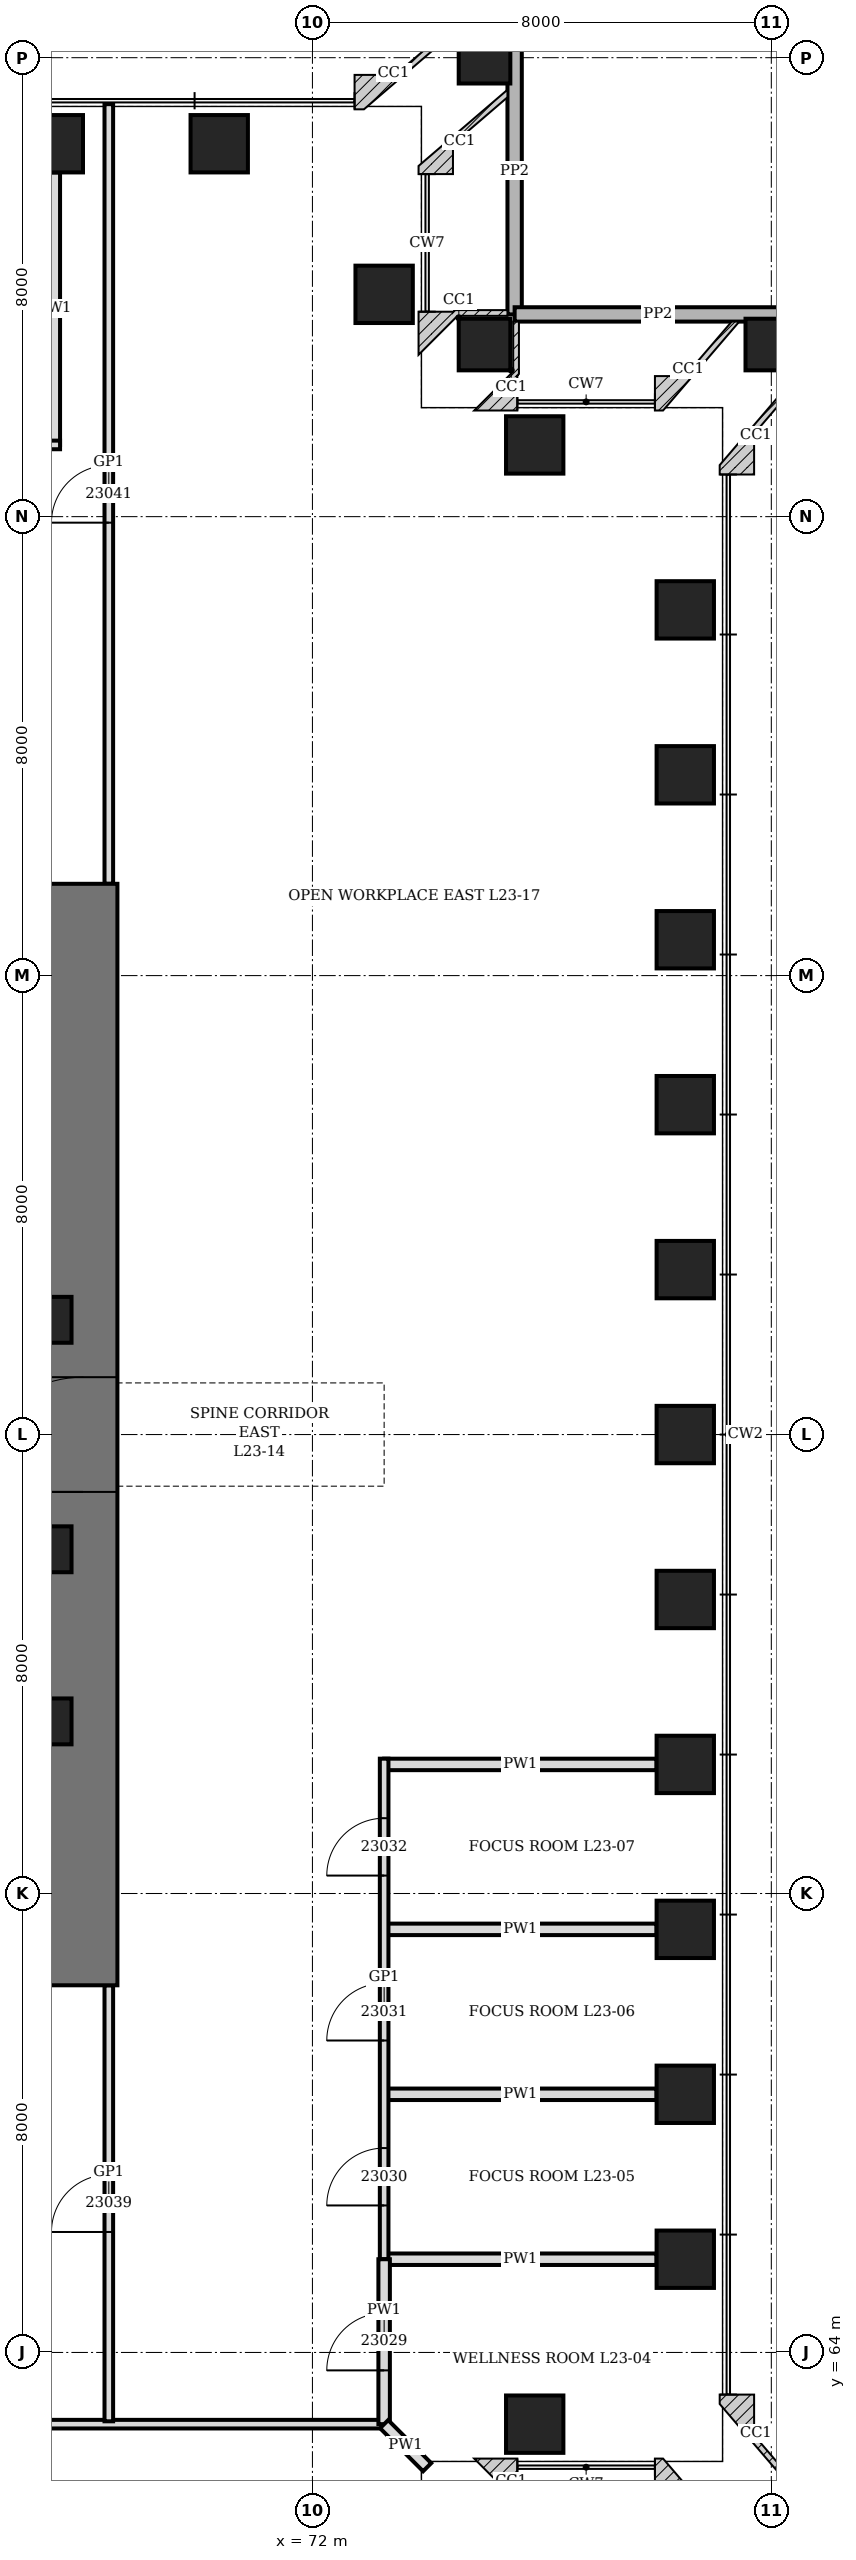
"""IFC4 building model, lengths in metres.
Left out: names, types, materials, properties, quantities, classifications, styles, units other than length and angle.
Written with IfcOpenShell. Run it as: python <this file> out.ifc"""

import sys

from ifc_helpers import new_model, si_unit, direction, frame, frame_2d, origin, origin_2d, place, context, subcontext, project, spatial, rectangle, hollow_rectangle, extrude, clip, halfspace, element, fill, save


model = new_model("IFC4")
c1 = context("Model", 3, precision=1e-05, world=origin(), true_north=direction((0.0, 1.0)))
c2 = subcontext(c1, "Body", "Model", "MODEL_VIEW")
j1 = project(units=[si_unit("LENGTHUNIT", "METRE"), si_unit("PLANEANGLEUNIT", "RADIAN")], contexts=[c1])
p1 = place(None, origin())
s1 = spatial("IfcSite", under=j1, at=p1, CompositionType="ELEMENT")
p2 = place(p1, origin())
s2 = spatial("IfcBuilding", under=s1, at=p2, CompositionType="ELEMENT")
p3 = place(p2, frame((0.0, 0.0, 108.1)))
s3 = spatial("IfcBuildingStorey", under=s2, at=p3, CompositionType="ELEMENT", Elevation=108.1)
p4 = place(p3, frame((75.0, 61.0, -0.25), z_axis=(-0.343685624304, 0.343685624304, 0.873933855216), x_axis=(-0.707106781187, -0.707106781187, 0.0)))
e1 = element("IfcColumn", 1, at=p4, inside=s3, PredefinedType="COLUMN", context=c2, shape_type="Clipping", body=[
    clip(clip(extrude(hollow_rectangle(XDim=0.9, YDim=0.9, WallThickness=0.2, at=origin_2d()), origin(), (0.0, 0.0, 1.0), 5.092), halfspace(frame((0.0, 0.0, 0.253), z_axis=(0.0, 0.0, 1.0), x_axis=(1.0, 0.0, 0.0)), True)), halfspace(frame((0.0, 0.0, 4.839), z_axis=(0.0, 0.0, -1.0), x_axis=(1.0, 0.0, 0.0)), True)),
])
p5 = place(p3, frame((75.875, 62.75, -0.25), z_axis=(0.0, 0.0, 1.0), x_axis=(1.0, 0.0, 0.0)))
e2 = element("IfcColumn", 2, at=p5, inside=s3, PredefinedType="COLUMN", context=c2, shape_type="SweptSolid", body=[
    extrude(hollow_rectangle(XDim=1.0, YDim=1.0, WallThickness=0.35, at=origin_2d()), origin(), (0.0, 0.0, 1.0), 4.45),
])
p6 = place(p3, frame((80.0, 61.0, -0.25), z_axis=(-0.299314960964, 0.349200787792, 0.887957974202), x_axis=(-0.759256602365, -0.650791373456, 0.0)))
e3 = element("IfcColumn", 3, at=p6, inside=s3, PredefinedType="COLUMN", context=c2, shape_type="Clipping", body=[
    clip(clip(extrude(hollow_rectangle(XDim=0.9, YDim=0.9, WallThickness=0.2, at=origin_2d()), origin(), (0.0, 0.0, 1.0), 5.011), halfspace(frame((0.0, 0.0, 0.235), z_axis=(0.0, 0.0, 1.0), x_axis=(1.0, 0.0, 0.0)), True)), halfspace(frame((0.0, 0.0, 4.776), z_axis=(0.0, 0.0, -1.0), x_axis=(1.0, 0.0, 0.0)), True)),
])
for number, where, z_axis, x_axis in (
    (4, (78.5, 65.625, -0.25), (0.0, 0.0, 1.0), (0.0, 1.0, 0.0)),
    (5, (78.5, 68.5, -0.25), (0.0, 0.0, 1.0), (0.0, 1.0, 0.0)),
    (6, (78.5, 71.375, -0.25), (0.0, 0.0, 1.0), (0.0, 1.0, 0.0)),
    (7, (78.5, 74.25, -0.25), (0.0, 0.0, 1.0), (0.0, 1.0, 0.0)),
    (8, (78.5, 77.125, -0.25), (0.0, 0.0, 1.0), (0.0, 1.0, 0.0)),
    (9, (78.5, 80.0, -0.25), (0.0, 0.0, 1.0), (0.0, 1.0, 0.0)),
    (10, (78.5, 82.875, -0.25), (0.0, 0.0, 1.0), (0.0, 1.0, 0.0)),
    (11, (78.5, 85.75, -0.25), (0.0, 0.0, 1.0), (0.0, 1.0, 0.0)),
    (12, (78.5, 88.625, -0.25), (0.0, 0.0, 1.0), (0.0, 1.0, 0.0)),
    (13, (78.5, 91.5, -0.25), (0.0, 0.0, 1.0), (0.0, 1.0, 0.0)),
    (14, (78.5, 94.375, -0.25), (0.0, 0.0, 1.0), (0.0, 1.0, 0.0)),
):
    element("IfcColumn", number, at=place(p3, frame(where, z_axis=z_axis, x_axis=x_axis)), inside=s3, PredefinedType="COLUMN", context=c2, shape_type="SweptSolid", body=[
        extrude(hollow_rectangle(XDim=1.0, YDim=1.0, WallThickness=0.35, at=origin_2d()), origin(), (0.0, 0.0, 1.0), 4.45),
    ])
p7 = place(p3, frame((80.0, 99.0, -0.25), z_axis=(-0.299314960964, -0.349200787792, 0.887957974202), x_axis=(0.759256602365, -0.650791373456, 0.0)))
e15 = element("IfcColumn", 15, at=p7, inside=s3, PredefinedType="COLUMN", context=c2, shape_type="Clipping", body=[
    clip(clip(extrude(hollow_rectangle(XDim=0.9, YDim=0.9, WallThickness=0.2, at=origin_2d()), origin(), (0.0, 0.0, 1.0), 5.011), halfspace(frame((0.0, 0.0, 0.235), z_axis=(0.0, 0.0, 1.0), x_axis=(1.0, 0.0, 0.0)), True)), halfspace(frame((0.0, 0.0, 4.776), z_axis=(0.0, 0.0, -1.0), x_axis=(1.0, 0.0, 0.0)), True)),
])
p8 = place(p3, frame((75.875, 97.25, -0.25), z_axis=(0.0, 0.0, 1.0), x_axis=(1.0, 0.0, 0.0)))
e16 = element("IfcColumn", 16, at=p8, inside=s3, PredefinedType="COLUMN", context=c2, shape_type="SweptSolid", body=[
    extrude(hollow_rectangle(XDim=1.0, YDim=1.0, WallThickness=0.35, at=origin_2d()), origin(), (0.0, 0.0, 1.0), 4.45),
])
p9 = place(p3, frame((75.0, 99.0, -0.25), z_axis=(-0.343685624304, -0.343685624304, 0.873933855216), x_axis=(0.707106781187, -0.707106781187, 0.0)))
e17 = element("IfcColumn", 17, at=p9, inside=s3, PredefinedType="COLUMN", context=c2, shape_type="Clipping", body=[
    clip(clip(extrude(hollow_rectangle(XDim=0.9, YDim=0.9, WallThickness=0.2, at=origin_2d()), origin(), (0.0, 0.0, 1.0), 5.092), halfspace(frame((0.0, 0.0, 0.253), z_axis=(0.0, 0.0, 1.0), x_axis=(1.0, 0.0, 0.0)), True)), halfspace(frame((0.0, 0.0, 4.839), z_axis=(0.0, 0.0, -1.0), x_axis=(1.0, 0.0, 0.0)), True)),
])
p10 = place(p3, frame((73.25, 99.875, -0.25), z_axis=(0.0, 0.0, 1.0), x_axis=(0.0, 1.0, 0.0)))
e18 = element("IfcColumn", 18, at=p10, inside=s3, PredefinedType="COLUMN", context=c2, shape_type="SweptSolid", body=[
    extrude(hollow_rectangle(XDim=1.0, YDim=1.0, WallThickness=0.35, at=origin_2d()), origin(), (0.0, 0.0, 1.0), 4.45),
])
p11 = place(p3, frame((75.0, 104.0, -0.25), z_axis=(-0.349200787792, -0.299314960964, 0.887957974202), x_axis=(0.650791373456, -0.759256602365, 0.0)))
e19 = element("IfcColumn", 19, at=p11, inside=s3, PredefinedType="COLUMN", context=c2, shape_type="Clipping", body=[
    clip(clip(extrude(hollow_rectangle(XDim=0.9, YDim=0.9, WallThickness=0.2, at=origin_2d()), origin(), (0.0, 0.0, 1.0), 5.011), halfspace(frame((0.0, 0.0, 0.235), z_axis=(0.0, 0.0, 1.0), x_axis=(1.0, 0.0, 0.0)), True)), halfspace(frame((0.0, 0.0, 4.776), z_axis=(0.0, 0.0, -1.0), x_axis=(1.0, 0.0, 0.0)), True)),
])
for number, where, z_axis, x_axis in (
    (20, (70.375, 102.5, -0.25), (0.0, 0.0, 1.0), (1.0, 0.0, 0.0)),
    (21, (67.5, 102.5, -0.25), (0.0, 0.0, 1.0), (1.0, 0.0, 0.0)),
):
    element("IfcColumn", number, at=place(p3, frame(where, z_axis=z_axis, x_axis=x_axis)), inside=s3, PredefinedType="COLUMN", context=c2, shape_type="SweptSolid", body=[
        extrude(hollow_rectangle(XDim=1.0, YDim=1.0, WallThickness=0.35, at=origin_2d()), origin(), (0.0, 0.0, 1.0), 4.45),
    ])
p12 = place(p3, frame((68.0, 70.4, 0.0), z_axis=(0.0, 0.0, 1.0), x_axis=(0.0, 1.0, 0.0)))
e22 = element("IfcWall", 22, at=p12, inside=s3, PredefinedType="SHEAR", context=c2, shape_type="SweptSolid", body=[
    extrude(rectangle(XDim=19.2, YDim=1.2, at=frame_2d((9.6, 0.0))), origin(), (0.0, 0.0, 1.0), 4.2),
])
p13 = place(p12, frame((8.6, 0.0, 0.0)))
e23 = element("IfcOpeningElement", 23, at=p13, cuts=e22, PredefinedType="OPENING", context=c2, shape_type="SweptSolid", body=[
    extrude(rectangle(XDim=2.0, YDim=2.4, at=frame_2d((1.0, 1.2))), frame((0.0, 0.61, 0.0), z_axis=(0.0, -1.0, 0.0), x_axis=(1.0, 0.0, 0.0)), (0.0, 0.0, 1.0), 1.22),
])
for number, where, z_axis, x_axis in (
    (24, (67.4, 75.0, 0.0), (0.0, 0.0, 1.0), (1.0, 0.0, 0.0)),
    (25, (67.4, 78.0, 0.0), (0.0, 0.0, 1.0), (1.0, 0.0, 0.0)),
    (26, (67.4, 82.0, 0.0), (0.0, 0.0, 1.0), (1.0, 0.0, 0.0)),
):
    element("IfcColumn", number, at=place(p3, frame(where, z_axis=z_axis, x_axis=x_axis)), inside=s3, PredefinedType="COLUMN", context=c2, shape_type="SweptSolid", body=[
        extrude(hollow_rectangle(XDim=0.8, YDim=0.8, WallThickness=0.1, at=origin_2d()), origin(), (0.0, 0.0, 1.0), 4.2),
    ])
for number, where, z_axis, x_axis in (
    (27, (75.525, 104.525, 0.0), (0.0, 0.0, 1.0), (0.0, -1.0, 0.0)),
    (28, (75.525, 99.525, 0.0), (0.0, 0.0, 1.0), (1.0, 0.0, 0.0)),
):
    element("IfcWall", number, at=place(p3, frame(where, z_axis=z_axis, x_axis=x_axis)), inside=s3, PredefinedType="PARAPET", context=c2, shape_type="SweptSolid", body=[
        extrude(rectangle(XDim=5.0, YDim=0.25, at=frame_2d((2.5, 0.0))), origin(), (0.0, 0.0, 1.0), 1.1),
    ])
for number, where, z_axis, x_axis in (
    (29, (73.25, 65.625, 0.0), (0.0, 0.0, 1.0), (1.0, 0.0, 0.0)),
    (30, (73.25, 68.5, 0.0), (0.0, 0.0, 1.0), (1.0, 0.0, 0.0)),
    (31, (73.25, 71.375, 0.0), (0.0, 0.0, 1.0), (1.0, 0.0, 0.0)),
    (32, (73.25, 74.25, 0.0), (0.0, 0.0, 1.0), (1.0, 0.0, 0.0)),
):
    element("IfcWall", number, at=place(p3, frame(where, z_axis=z_axis, x_axis=x_axis)), inside=s3, PredefinedType="PARTITIONING", context=c2, shape_type="SweptSolid", body=[
        extrude(rectangle(XDim=4.75, YDim=0.2, at=frame_2d((2.375, 0.0))), origin(), (0.0, 0.0, 1.0), 3.428),
    ])
p14 = place(p3, frame((67.5, 97.25, 0.0), z_axis=(0.0, 0.0, 1.0), x_axis=(0.0, 1.0, 0.0)))
e33 = element("IfcWall", 33, at=p14, inside=s3, PredefinedType="PARTITIONING", context=c2, shape_type="SweptSolid", body=[
    extrude(rectangle(XDim=4.75, YDim=0.2, at=frame_2d((2.375, 0.0))), origin(), (0.0, 0.0, 1.0), 2.74),
])
p15 = place(p3, frame((38.75, 62.75, 0.0), z_axis=(0.0, 0.0, 1.0), x_axis=(1.0, 0.0, 0.0)))
e34 = element("IfcWall", 34, at=p15, inside=s3, PredefinedType="PARTITIONING", context=c2, shape_type="SweptSolid", body=[
    extrude(rectangle(XDim=34.5, YDim=0.15, at=frame_2d((17.25, 0.0))), origin(), (0.0, 0.0, 1.0), 4.04),
])
p16 = place(p15, frame((3.5, 0.0, 0.0)))
e35 = element("IfcOpeningElement", 35, at=p16, cuts=e34, PredefinedType="OPENING", context=c2, shape_type="SweptSolid", body=[
    extrude(rectangle(XDim=1.0, YDim=2.4, at=frame_2d((0.5, 1.2))), frame((0.0, 0.085, 0.0), z_axis=(0.0, -1.0, 0.0), x_axis=(1.0, 0.0, 0.0)), (0.0, 0.0, 1.0), 0.17),
])
p17 = place(p15, frame((15.312, 0.0, 0.0)))
e36 = element("IfcOpeningElement", 36, at=p17, cuts=e34, PredefinedType="OPENING", context=c2, shape_type="SweptSolid", body=[
    extrude(rectangle(XDim=1.0, YDim=2.4, at=frame_2d((0.5, 1.2))), frame((0.0, 0.085, 0.0), z_axis=(0.0, -1.0, 0.0), x_axis=(1.0, 0.0, 0.0)), (0.0, 0.0, 1.0), 0.17),
])
p18 = place(p15, frame((26.812, 0.0, 0.0)))
e37 = element("IfcOpeningElement", 37, at=p18, cuts=e34, PredefinedType="OPENING", context=c2, shape_type="SweptSolid", body=[
    extrude(rectangle(XDim=1.0, YDim=2.4, at=frame_2d((0.5, 1.2))), frame((0.0, 0.085, 0.0), z_axis=(0.0, -1.0, 0.0), x_axis=(1.0, 0.0, 0.0)), (0.0, 0.0, 1.0), 0.17),
])
p19 = place(p3, frame((38.75, 97.25, 0.0), z_axis=(0.0, 0.0, 1.0), x_axis=(1.0, 0.0, 0.0)))
e38 = element("IfcWall", 38, at=p19, inside=s3, PredefinedType="PARTITIONING", context=c2, shape_type="SweptSolid", body=[
    extrude(rectangle(XDim=28.85, YDim=0.15, at=frame_2d((14.425, 0.0))), origin(), (0.0, 0.0, 1.0), 4.04),
])
p20 = place(p19, frame((3.5, 0.0, 0.0)))
e39 = element("IfcOpeningElement", 39, at=p20, cuts=e38, PredefinedType="OPENING", context=c2, shape_type="SweptSolid", body=[
    extrude(rectangle(XDim=1.0, YDim=2.4, at=frame_2d((0.5, 1.2))), frame((0.0, 0.085, 0.0), z_axis=(0.0, -1.0, 0.0), x_axis=(1.0, 0.0, 0.0)), (0.0, 0.0, 1.0), 0.17),
])
p21 = place(p19, frame((15.312, 0.0, 0.0)))
e40 = element("IfcOpeningElement", 40, at=p21, cuts=e38, PredefinedType="OPENING", context=c2, shape_type="SweptSolid", body=[
    extrude(rectangle(XDim=1.0, YDim=2.4, at=frame_2d((0.5, 1.2))), frame((0.0, 0.085, 0.0), z_axis=(0.0, -1.0, 0.0), x_axis=(1.0, 0.0, 0.0)), (0.0, 0.0, 1.0), 0.17),
])
p22 = place(p19, frame((23.938, 0.0, 0.0)))
e41 = element("IfcOpeningElement", 41, at=p22, cuts=e38, PredefinedType="OPENING", context=c2, shape_type="SweptSolid", body=[
    extrude(rectangle(XDim=1.0, YDim=2.4, at=frame_2d((0.5, 1.2))), frame((0.0, 0.085, 0.0), z_axis=(0.0, -1.0, 0.0), x_axis=(1.0, 0.0, 0.0)), (0.0, 0.0, 1.0), 0.17),
])
p23 = place(p3, frame((68.45, 62.8, 0.0), z_axis=(0.0, 0.0, 1.0), x_axis=(0.0, 1.0, 0.0)))
e42 = element("IfcWall", 42, at=p23, inside=s3, PredefinedType="PARTITIONING", context=c2, shape_type="SweptSolid", body=[
    extrude(rectangle(XDim=7.6, YDim=0.15, at=frame_2d((3.8, 0.0))), origin(), (0.0, 0.0, 1.0), 4.04),
])
p24 = place(p23, frame((3.3, 0.0, 0.0)))
e43 = element("IfcOpeningElement", 43, at=p24, cuts=e42, PredefinedType="OPENING", context=c2, shape_type="SweptSolid", body=[
    extrude(rectangle(XDim=1.0, YDim=2.4, at=frame_2d((0.5, 1.2))), frame((0.0, 0.085, 0.0), z_axis=(0.0, -1.0, 0.0), x_axis=(1.0, 0.0, 0.0)), (0.0, 0.0, 1.0), 0.17),
])
p25 = place(p3, frame((68.45, 89.6, 0.0), z_axis=(0.0, 0.0, 1.0), x_axis=(0.0, 1.0, 0.0)))
e44 = element("IfcWall", 44, at=p25, inside=s3, PredefinedType="PARTITIONING", context=c2, shape_type="SweptSolid", body=[
    extrude(rectangle(XDim=13.59, YDim=0.15, at=frame_2d((6.795, 0.0))), origin(), (0.0, 0.0, 1.0), 4.04),
])
p26 = place(p25, frame((6.295, 0.0, 0.0)))
e45 = element("IfcOpeningElement", 45, at=p26, cuts=e44, PredefinedType="OPENING", context=c2, shape_type="SweptSolid", body=[
    extrude(rectangle(XDim=1.0, YDim=2.4, at=frame_2d((0.5, 1.2))), frame((0.0, 0.085, 0.0), z_axis=(0.0, -1.0, 0.0), x_axis=(1.0, 0.0, 0.0)), (0.0, 0.0, 1.0), 0.17),
])
p27 = place(p3, frame((73.25, 65.625, 0.0), z_axis=(0.0, 0.0, 1.0), x_axis=(0.0, 1.0, 0.0)))
e46 = element("IfcWall", 46, at=p27, inside=s3, PredefinedType="PARTITIONING", context=c2, shape_type="SweptSolid", body=[
    extrude(rectangle(XDim=8.725, YDim=0.15, at=frame_2d((4.363, 0.0))), origin(), (0.0, 0.0, 1.0), 4.04),
])
p28 = place(p27, frame((0.938, 0.0, 0.0)))
e47 = element("IfcOpeningElement", 47, at=p28, cuts=e46, PredefinedType="OPENING", context=c2, shape_type="SweptSolid", body=[
    extrude(rectangle(XDim=1.0, YDim=2.4, at=frame_2d((0.5, 1.2))), frame((0.0, 0.085, 0.0), z_axis=(0.0, -1.0, 0.0), x_axis=(1.0, 0.0, 0.0)), (0.0, 0.0, 1.0), 0.17),
])
p29 = place(p27, frame((3.812, 0.0, 0.0)))
e48 = element("IfcOpeningElement", 48, at=p29, cuts=e46, PredefinedType="OPENING", context=c2, shape_type="SweptSolid", body=[
    extrude(rectangle(XDim=1.0, YDim=2.4, at=frame_2d((0.5, 1.2))), frame((0.0, 0.085, 0.0), z_axis=(0.0, -1.0, 0.0), x_axis=(1.0, 0.0, 0.0)), (0.0, 0.0, 1.0), 0.17),
])
p30 = place(p27, frame((6.688, 0.0, 0.0)))
e49 = element("IfcOpeningElement", 49, at=p30, cuts=e46, PredefinedType="OPENING", context=c2, shape_type="SweptSolid", body=[
    extrude(rectangle(XDim=1.0, YDim=2.4, at=frame_2d((0.5, 1.2))), frame((0.0, 0.085, 0.0), z_axis=(0.0, -1.0, 0.0), x_axis=(1.0, 0.0, 0.0)), (0.0, 0.0, 1.0), 0.17),
])
p31 = place(p3, frame((73.25, 62.75, 0.0), z_axis=(0.0, 0.0, 1.0), x_axis=(0.0, 1.0, 0.0)))
e50 = element("IfcWall", 50, at=p31, inside=s3, PredefinedType="PARTITIONING", context=c2, shape_type="SweptSolid", body=[
    extrude(rectangle(XDim=2.875, YDim=0.2, at=frame_2d((1.438, 0.0))), origin(), (0.0, 0.0, 1.0), 4.04),
])
p32 = place(p31, frame((0.938, 0.0, 0.0)))
e51 = element("IfcOpeningElement", 51, at=p32, cuts=e50, PredefinedType="OPENING", context=c2, shape_type="SweptSolid", body=[
    extrude(rectangle(XDim=1.0, YDim=2.1, at=frame_2d((0.5, 1.05))), frame((0.0, 0.11, 0.0), z_axis=(0.0, -1.0, 0.0), x_axis=(1.0, 0.0, 0.0)), (0.0, 0.0, 1.0), 0.22),
])
p33 = place(p3, frame((73.25, 62.75, 0.0), z_axis=(0.0, 0.0, 1.0), x_axis=(0.707106781187, -0.707106781187, 0.0)))
e52 = element("IfcWall", 52, at=p33, inside=s3, PredefinedType="PARTITIONING", context=c2, shape_type="SweptSolid", body=[
    extrude(rectangle(XDim=1.061, YDim=0.2, at=frame_2d((0.53, 0.0))), origin(), (0.0, 0.0, 1.0), 4.04),
])
p34 = place(p13, origin())
e53 = element("IfcDoor", 53, at=p34, inside=s3, OperationType="DOUBLE_DOOR_SINGLE_SWING", PredefinedType="DOOR", context=c2, shape_type="SweptSolid", body=[
    extrude(rectangle(XDim=2.0, YDim=2.4, at=frame_2d((1.0, 1.2))), frame((0.0, 0.35, 0.0), z_axis=(0.0, -1.0, 0.0), x_axis=(1.0, 0.0, 0.0)), (0.0, 0.0, 1.0), 0.7),
])
fill(e23, e53)
p35 = place(p32, origin())
e54 = element("IfcDoor", 54, at=p35, inside=s3, OperationType="SINGLE_SWING_LEFT", PredefinedType="DOOR", context=c2, shape_type="SweptSolid", body=[
    extrude(rectangle(XDim=1.0, YDim=2.1, at=frame_2d((0.5, 1.05))), frame((0.0, 0.1, 0.0), z_axis=(0.0, -1.0, 0.0), x_axis=(1.0, 0.0, 0.0)), (0.0, 0.0, 1.0), 0.199),
])
fill(e51, e54)
p36 = place(p28, origin())
e55 = element("IfcDoor", 55, at=p36, inside=s3, OperationType="SINGLE_SWING_RIGHT", PredefinedType="DOOR", context=c2, shape_type="SweptSolid", body=[
    extrude(rectangle(XDim=1.0, YDim=2.4, at=frame_2d((0.5, 1.2))), frame((0.0, 0.075, 0.0), z_axis=(0.0, -1.0, 0.0), x_axis=(1.0, 0.0, 0.0)), (0.0, 0.0, 1.0), 0.149),
])
fill(e47, e55)
p37 = place(p29, origin())
e56 = element("IfcDoor", 56, at=p37, inside=s3, OperationType="SINGLE_SWING_RIGHT", PredefinedType="DOOR", context=c2, shape_type="SweptSolid", body=[
    extrude(rectangle(XDim=1.0, YDim=2.4, at=frame_2d((0.5, 1.2))), frame((0.0, 0.075, 0.0), z_axis=(0.0, -1.0, 0.0), x_axis=(1.0, 0.0, 0.0)), (0.0, 0.0, 1.0), 0.149),
])
fill(e48, e56)
p38 = place(p30, origin())
e57 = element("IfcDoor", 57, at=p38, inside=s3, OperationType="SINGLE_SWING_RIGHT", PredefinedType="DOOR", context=c2, shape_type="SweptSolid", body=[
    extrude(rectangle(XDim=1.0, YDim=2.4, at=frame_2d((0.5, 1.2))), frame((0.0, 0.075, 0.0), z_axis=(0.0, -1.0, 0.0), x_axis=(1.0, 0.0, 0.0)), (0.0, 0.0, 1.0), 0.149),
])
fill(e49, e57)
p39 = place(p24, origin())
e58 = element("IfcDoor", 58, at=p39, inside=s3, OperationType="SINGLE_SWING_RIGHT", PredefinedType="DOOR", context=c2, shape_type="SweptSolid", body=[
    extrude(rectangle(XDim=1.0, YDim=2.4, at=frame_2d((0.5, 1.2))), frame((0.0, 0.075, 0.0), z_axis=(0.0, -1.0, 0.0), x_axis=(1.0, 0.0, 0.0)), (0.0, 0.0, 1.0), 0.149),
])
fill(e43, e58)
p40 = place(p26, origin())
e59 = element("IfcDoor", 59, at=p40, inside=s3, OperationType="SINGLE_SWING_RIGHT", PredefinedType="DOOR", context=c2, shape_type="SweptSolid", body=[
    extrude(rectangle(XDim=1.0, YDim=2.4, at=frame_2d((0.5, 1.2))), frame((0.0, 0.075, 0.0), z_axis=(0.0, -1.0, 0.0), x_axis=(1.0, 0.0, 0.0)), (0.0, 0.0, 1.0), 0.149),
])
fill(e45, e59)
save(model, sys.argv[1])
